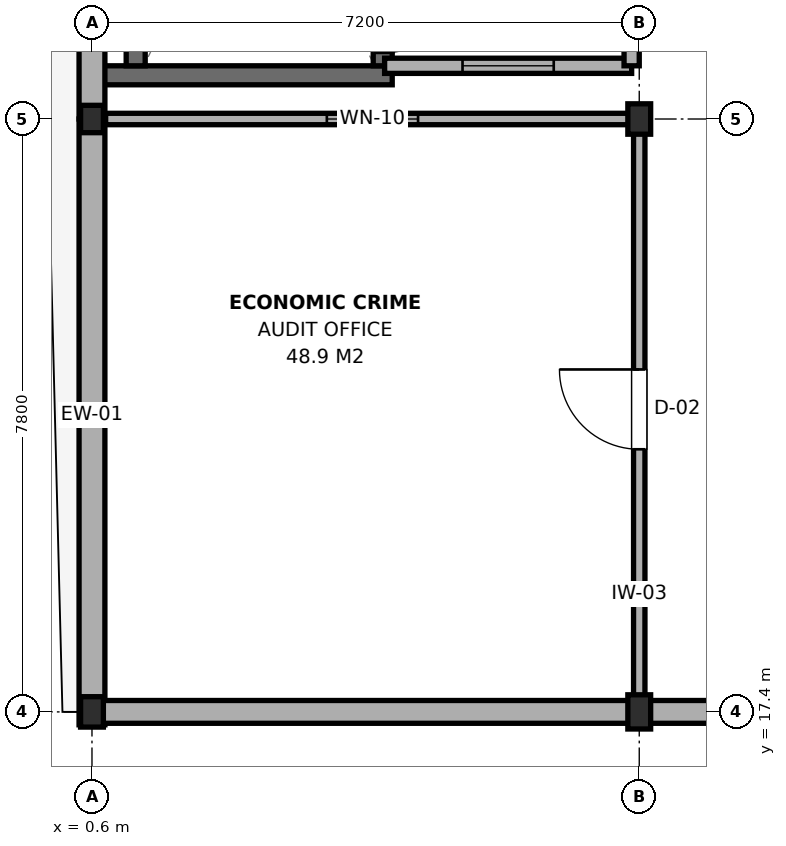
"""IFC4 building model, lengths in metres.
Left out: names, types, materials, properties, quantities, classifications, styles, units other than length and angle.
Written with IfcOpenShell. Run it as: python <this file> out.ifc"""

import sys

from ifc_helpers import new_model, si_unit, direction, frame, frame_2d, origin, origin_2d, place, context, subcontext, project, spatial, rectangle, i_section, extrude, element, fill, save


model = new_model("IFC4")
c1 = context("Model", 3, precision=1e-05, world=origin(), true_north=direction((0.0, 1.0)))
c2 = subcontext(c1, "Body", "Model", "MODEL_VIEW")
j1 = project(units=[si_unit("LENGTHUNIT", "METRE"), si_unit("PLANEANGLEUNIT", "RADIAN")], contexts=[c1])
p1 = place(None, origin())
s1 = spatial("IfcSite", under=j1, at=p1, CompositionType="ELEMENT")
p2 = place(p1, origin())
s2 = spatial("IfcBuilding", under=s1, at=p2, CompositionType="ELEMENT")
p3 = place(p2, frame((0.0, 0.0, 17.1)))
s3 = spatial("IfcBuildingStorey", under=s2, at=p3, CompositionType="ELEMENT", Elevation=17.1)
p4 = place(p3, frame((0.6, 17.4, 0.0), z_axis=(0.0, 0.0, 1.0), x_axis=(1.0, 0.0, 0.0)))
e1 = element("IfcColumn", 1, at=p4, inside=s3, PredefinedType="COLUMN", context=c2, shape_type="SweptSolid", body=[
    extrude(i_section(OverallWidth=0.3, OverallDepth=0.4, WebThickness=0.013, FlangeThickness=0.024, FilletRadius=0.027, at=origin_2d()), origin(), (0.0, 0.0, 1.0), 3.9),
])
p5 = place(p3, frame((0.6, 25.2, 0.0), z_axis=(0.0, 0.0, 1.0), x_axis=(1.0, 0.0, 0.0)))
e2 = element("IfcColumn", 2, at=p5, inside=s3, PredefinedType="COLUMN", context=c2, shape_type="SweptSolid", body=[
    extrude(i_section(OverallWidth=0.3, OverallDepth=0.36, WebThickness=0.012, FlangeThickness=0.022, FilletRadius=0.027, at=origin_2d()), origin(), (0.0, 0.0, 1.0), 3.9),
])
p6 = place(p3, frame((7.8, 17.4, 0.0), z_axis=(0.0, 0.0, 1.0), x_axis=(1.0, 0.0, 0.0)))
e3 = element("IfcColumn", 3, at=p6, inside=s3, PredefinedType="COLUMN", context=c2, shape_type="SweptSolid", body=[
    extrude(i_section(OverallWidth=0.3, OverallDepth=0.45, WebThickness=0.014, FlangeThickness=0.026, FilletRadius=0.027, at=origin_2d()), origin(), (0.0, 0.0, 1.0), 3.9),
])
p7 = place(p3, frame((7.8, 25.2, 0.0), z_axis=(0.0, 0.0, 1.0), x_axis=(1.0, 0.0, 0.0)))
e4 = element("IfcColumn", 4, at=p7, inside=s3, PredefinedType="COLUMN", context=c2, shape_type="SweptSolid", body=[
    extrude(i_section(OverallWidth=0.3, OverallDepth=0.4, WebThickness=0.013, FlangeThickness=0.024, FilletRadius=0.027, at=origin_2d()), origin(), (0.0, 0.0, 1.0), 3.9),
])
p8 = place(p3, frame((0.75, 25.775, 0.0), z_axis=(0.0, 0.0, 1.0), x_axis=(1.0, 0.0, 0.0)))
e5 = element("IfcWall", 5, at=p8, inside=s3, PredefinedType="SHEAR", context=c2, shape_type="SweptSolid", body=[
    extrude(rectangle(XDim=3.8, YDim=0.25, at=frame_2d((1.9, 0.0))), origin(), (0.0, 0.0, 1.0), 3.7),
])
p9 = place(p3, frame((1.175, 25.9, 0.0), z_axis=(0.0, 0.0, 1.0), x_axis=(0.0, 1.0, 0.0)))
e6 = element("IfcWall", 6, at=p9, inside=s3, PredefinedType="SHEAR", context=c2, shape_type="SweptSolid", body=[
    extrude(rectangle(XDim=6.4, YDim=0.25, at=frame_2d((3.2, 0.0))), origin(), (0.0, 0.0, 1.0), 3.7),
])
p10 = place(p3, frame((4.425, 25.9, 0.0), z_axis=(0.0, 0.0, 1.0), x_axis=(0.0, 1.0, 0.0)))
e7 = element("IfcWall", 7, at=p10, inside=s3, PredefinedType="SHEAR", context=c2, shape_type="SweptSolid", body=[
    extrude(rectangle(XDim=6.4, YDim=0.25, at=frame_2d((3.2, 0.0))), origin(), (0.0, 0.0, 1.0), 3.7),
])
p11 = place(p10, frame((0.17, 0.0, 0.0)))
e8 = element("IfcOpeningElement", 8, at=p11, cuts=e7, PredefinedType="OPENING", context=c2, shape_type="SweptSolid", body=[
    extrude(rectangle(XDim=1.1, YDim=2.15, at=frame_2d((0.55, 1.075))), frame((0.0, 0.14, 0.0), z_axis=(0.0, -1.0, 0.0), x_axis=(1.0, 0.0, 0.0)), (0.0, 0.0, 1.0), 0.28),
])
p12 = place(p3, frame((0.6, 17.23, 0.0), z_axis=(0.0, 0.0, 1.0), x_axis=(0.0, 1.0, 0.0)))
e9 = element("IfcWall", 9, at=p12, inside=s3, PredefinedType="SOLIDWALL", context=c2, shape_type="SweptSolid", body=[
    extrude(rectangle(XDim=7.97, YDim=0.34, at=frame_2d((3.985, 0.0))), origin(), (0.0, 0.0, 1.0), 3.095),
])
p13 = place(p3, frame((0.6, 25.2, 0.0), z_axis=(0.0, 0.0, 1.0), x_axis=(0.0, 1.0, 0.0)))
e10 = element("IfcWall", 10, at=p13, inside=s3, PredefinedType="SOLIDWALL", context=c2, shape_type="SweptSolid", body=[
    extrude(rectangle(XDim=5.6, YDim=0.34, at=frame_2d((2.8, 0.0))), origin(), (0.0, 0.0, 1.0), 3.095),
])
p14 = place(p3, frame((0.45, 17.4, 0.0), z_axis=(0.0, 0.0, 1.0), x_axis=(1.0, 0.0, 0.0)))
e11 = element("IfcWall", 11, at=p14, inside=s3, PredefinedType="SOLIDWALL", context=c2, shape_type="SweptSolid", body=[
    extrude(rectangle(XDim=7.35, YDim=0.3, at=frame_2d((3.675, 0.0))), origin(), (0.0, 0.0, 1.0), 3.095),
])
p15 = place(p3, frame((7.8, 17.4, 0.0), z_axis=(0.0, 0.0, 1.0), x_axis=(1.0, 0.0, 0.0)))
e12 = element("IfcWall", 12, at=p15, inside=s3, PredefinedType="SOLIDWALL", context=c2, shape_type="SweptSolid", body=[
    extrude(rectangle(XDim=7.2, YDim=0.3, at=frame_2d((3.6, 0.0))), origin(), (0.0, 0.0, 1.0), 3.095),
])
p16 = place(p15, frame((2.7, 0.0, 0.65)))
e13 = element("IfcOpeningElement", 13, at=p16, cuts=e12, PredefinedType="OPENING", context=c2, shape_type="SweptSolid", body=[
    extrude(rectangle(XDim=1.8, YDim=1.2, at=frame_2d((0.9, 0.6))), frame((0.0, 0.165, 0.0), z_axis=(0.0, -1.0, 0.0), x_axis=(1.0, 0.0, 0.0)), (0.0, 0.0, 1.0), 0.33),
])
p17 = place(p3, frame((4.45, 25.9, 0.0), z_axis=(0.0, 0.0, 1.0), x_axis=(1.0, 0.0, 0.0)))
e14 = element("IfcWall", 14, at=p17, inside=s3, PredefinedType="PARTITIONING", context=c2, shape_type="SweptSolid", body=[
    extrude(rectangle(XDim=3.25, YDim=0.2, at=frame_2d((1.625, 0.0))), origin(), (0.0, 0.0, 1.0), 3.345),
])
p18 = place(p17, frame((1.025, 0.0, 0.95)))
e15 = element("IfcOpeningElement", 15, at=p18, cuts=e14, PredefinedType="OPENING", context=c2, shape_type="SweptSolid", body=[
    extrude(rectangle(XDim=1.2, YDim=1.5, at=frame_2d((0.6, 0.75))), frame((0.0, 0.115, 0.0), z_axis=(0.0, -1.0, 0.0), x_axis=(1.0, 0.0, 0.0)), (0.0, 0.0, 1.0), 0.23),
])
p19 = place(p3, frame((7.7, 25.9, 0.0), z_axis=(0.0, 0.0, 1.0), x_axis=(0.0, 1.0, 0.0)))
e16 = element("IfcWall", 16, at=p19, inside=s3, PredefinedType="PARTITIONING", context=c2, shape_type="SweptSolid", body=[
    extrude(rectangle(XDim=3.6, YDim=0.2, at=frame_2d((1.8, 0.0))), origin(), (0.0, 0.0, 1.0), 3.345),
])
p20 = place(p19, frame((1.25, 0.0, 0.0)))
e17 = element("IfcOpeningElement", 17, at=p20, cuts=e16, PredefinedType="OPENING", context=c2, shape_type="SweptSolid", body=[
    extrude(rectangle(XDim=1.1, YDim=2.15, at=frame_2d((0.55, 1.075))), frame((0.0, 0.115, 0.0), z_axis=(0.0, -1.0, 0.0), x_axis=(1.0, 0.0, 0.0)), (0.0, 0.0, 1.0), 0.23),
])
p21 = place(p3, frame((7.8, 17.56, 0.0), z_axis=(0.0, 0.0, 1.0), x_axis=(0.0, 1.0, 0.0)))
e18 = element("IfcWall", 18, at=p21, inside=s3, PredefinedType="PARTITIONING", context=c2, shape_type="SweptSolid", body=[
    extrude(rectangle(XDim=7.64, YDim=0.15, at=frame_2d((3.82, 0.0))), origin(), (0.0, 0.0, 1.0), 3.095),
])
p22 = place(p21, frame((3.295, 0.0, 0.0)))
e19 = element("IfcOpeningElement", 19, at=p22, cuts=e18, PredefinedType="OPENING", context=c2, shape_type="SweptSolid", body=[
    extrude(rectangle(XDim=1.05, YDim=2.15, at=frame_2d((0.525, 1.075))), frame((0.0, 0.09, 0.0), z_axis=(0.0, -1.0, 0.0), x_axis=(1.0, 0.0, 0.0)), (0.0, 0.0, 1.0), 0.18),
])
p23 = place(p3, frame((0.78, 25.2, 0.0), z_axis=(0.0, 0.0, 1.0), x_axis=(1.0, 0.0, 0.0)))
e20 = element("IfcWall", 20, at=p23, inside=s3, PredefinedType="PARTITIONING", context=c2, shape_type="SweptSolid", body=[
    extrude(rectangle(XDim=7.02, YDim=0.15, at=frame_2d((3.51, 0.0))), origin(), (0.0, 0.0, 1.0), 3.195),
])
p24 = place(p23, frame((2.91, 0.0, 0.95)))
e21 = element("IfcOpeningElement", 21, at=p24, cuts=e20, PredefinedType="OPENING", context=c2, shape_type="SweptSolid", body=[
    extrude(rectangle(XDim=1.2, YDim=1.5, at=frame_2d((0.6, 0.75))), frame((0.0, 0.09, 0.0), z_axis=(0.0, -1.0, 0.0), x_axis=(1.0, 0.0, 0.0)), (0.0, 0.0, 1.0), 0.18),
])
p25 = place(p11, frame((1.1, 0.0, 0.0), z_axis=(0.0, 0.0, 1.0), x_axis=(-1.0, 0.0, 0.0)))
e22 = element("IfcDoor", 22, at=p25, inside=s3, OperationType="SINGLE_SWING_LEFT", PredefinedType="DOOR", context=c2, shape_type="SweptSolid", body=[
    extrude(rectangle(XDim=1.1, YDim=2.15, at=frame_2d((0.55, 1.075))), frame((0.0, 0.025, 0.0), z_axis=(0.0, -1.0, 0.0), x_axis=(1.0, 0.0, 0.0)), (0.0, 0.0, 1.0), 0.05),
])
fill(e8, e22)
p26 = place(p18, origin())
e23 = element("IfcWindow", 23, at=p26, inside=s3, PartitioningType="SINGLE_PANEL", PredefinedType="WINDOW", context=c2, shape_type="SweptSolid", body=[
    extrude(rectangle(XDim=1.2, YDim=1.5, at=frame_2d((0.6, 0.75))), frame((0.0, 0.03, 0.0), z_axis=(0.0, -1.0, 0.0), x_axis=(1.0, 0.0, 0.0)), (0.0, 0.0, 1.0), 0.06),
])
fill(e15, e23)
p27 = place(p22, origin())
e24 = element("IfcDoor", 24, at=p27, inside=s3, OperationType="SINGLE_SWING_RIGHT", PredefinedType="DOOR", context=c2, shape_type="SweptSolid", body=[
    extrude(rectangle(XDim=1.05, YDim=2.15, at=frame_2d((0.525, 1.075))), frame((0.0, 0.025, 0.0), z_axis=(0.0, -1.0, 0.0), x_axis=(1.0, 0.0, 0.0)), (0.0, 0.0, 1.0), 0.05),
])
fill(e19, e24)
p28 = place(p24, origin())
e25 = element("IfcWindow", 25, at=p28, inside=s3, PartitioningType="SINGLE_PANEL", PredefinedType="WINDOW", context=c2, shape_type="SweptSolid", body=[
    extrude(rectangle(XDim=1.2, YDim=1.5, at=frame_2d((0.6, 0.75))), frame((0.0, 0.03, 0.0), z_axis=(0.0, -1.0, 0.0), x_axis=(1.0, 0.0, 0.0)), (0.0, 0.0, 1.0), 0.06),
])
fill(e21, e25)
save(model, sys.argv[1])
